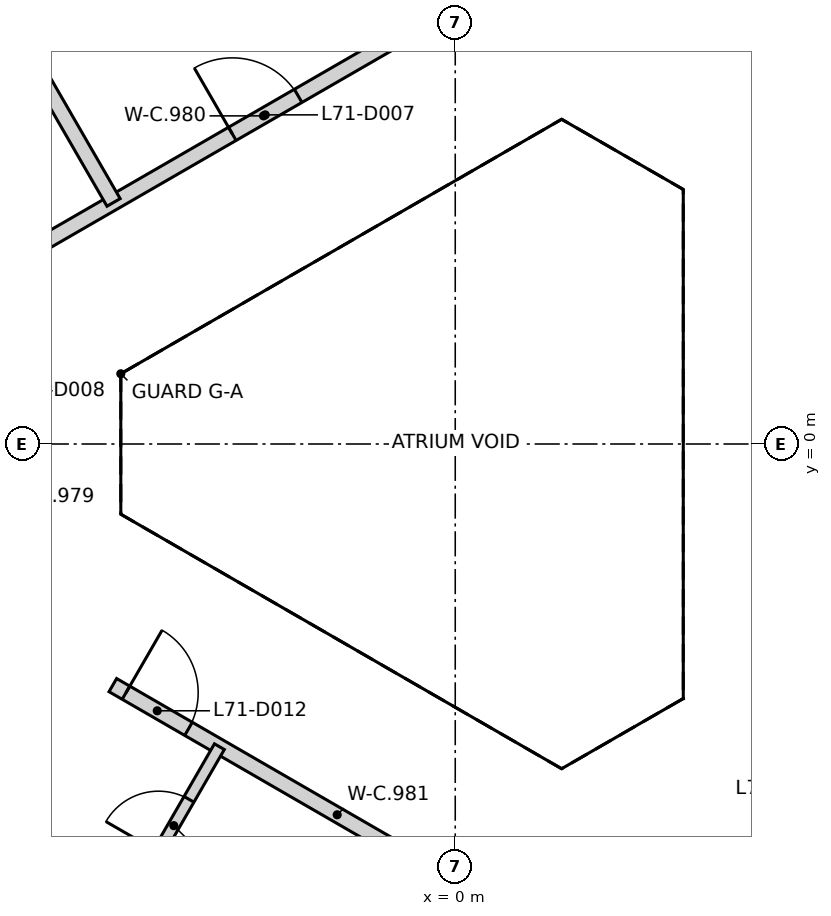
"""IFC4 building model, lengths in metres.
Left out: names, types, materials, properties, quantities, classifications, styles, units other than length and angle.
Written with IfcOpenShell. Run it as: python <this file> out.ifc"""

import sys

from ifc_helpers import new_model, si_unit, direction, frame, frame_2d, origin, place, context, subcontext, project, spatial, rectangle, extrude, element, fill, save


model = new_model("IFC4")
c1 = context("Model", 3, precision=1e-05, world=origin(), true_north=direction((0.0, 1.0)))
c2 = subcontext(c1, "Body", "Model", "MODEL_VIEW")
j1 = project(units=[si_unit("LENGTHUNIT", "METRE"), si_unit("PLANEANGLEUNIT", "RADIAN")], contexts=[c1])
p1 = place(None, origin())
s1 = spatial("IfcSite", under=j1, at=p1, CompositionType="ELEMENT")
p2 = place(p1, origin())
s2 = spatial("IfcBuilding", under=s1, at=p2, CompositionType="ELEMENT")
p3 = place(p2, frame((0.0, 0.0, 280.2)))
s3 = spatial("IfcBuildingStorey", under=s2, at=p3, CompositionType="ELEMENT", Elevation=280.2)
p4 = place(p3, frame((-6.4, 2.079, 0.0), z_axis=(0.0, 0.0, 1.0), x_axis=(0.866044821263, 0.499966366432, 0.0)))
e1 = element("IfcWall", 1, at=p4, inside=s3, PredefinedType="PARTITIONING", context=c2, shape_type="SweptSolid", body=[
    extrude(rectangle(XDim=8.953, YDim=0.2, at=frame_2d((4.477, 0.0))), origin(), (0.0, 0.0, 1.0), 3.25),
])
p5 = place(p4, frame((4.003, 0.0, 0.0)))
e2 = element("IfcOpeningElement", 2, at=p5, cuts=e1, PredefinedType="OPENING", context=c2, shape_type="SweptSolid", body=[
    extrude(rectangle(XDim=1.0, YDim=2.1, at=frame_2d((0.5, 1.05))), frame((0.0, 0.11, 0.0), z_axis=(0.0, -1.0, 0.0), x_axis=(1.0, 0.0, 0.0)), (0.0, 0.0, 1.0), 0.22),
])
p6 = place(p3, frame((-4.505, -3.172, 0.0), z_axis=(0.0, 0.0, 1.0), x_axis=(0.865815783666, -0.500362897061, 0.0)))
e3 = element("IfcWall", 3, at=p6, inside=s3, PredefinedType="PARTITIONING", context=c2, shape_type="SweptSolid", body=[
    extrude(rectangle(XDim=6.819, YDim=0.2, at=frame_2d((3.409, 0.0))), origin(), (0.0, 0.0, 1.0), 3.25),
])
p7 = place(p6, frame((0.2, 0.0, 0.0)))
e4 = element("IfcOpeningElement", 4, at=p7, cuts=e3, PredefinedType="OPENING", context=c2, shape_type="SweptSolid", body=[
    extrude(rectangle(XDim=0.95, YDim=2.1, at=frame_2d((0.475, 1.05))), frame((0.0, 0.11, 0.0), z_axis=(0.0, -1.0, 0.0), x_axis=(1.0, 0.0, 0.0)), (0.0, 0.0, 1.0), 0.22),
])
p8 = place(p3, frame((-11.035, 14.505, 0.0), z_axis=(0.0, 0.0, 1.0), x_axis=(0.499989597041, -0.866031409852, 0.0)))
e5 = element("IfcWall", 5, at=p8, inside=s3, PredefinedType="PARTITIONING", context=c2, shape_type="SweptSolid", body=[
    extrude(rectangle(XDim=13.079, YDim=0.2, at=frame_2d((6.54, 0.0))), origin(), (0.0, 0.0, 1.0), 3.25),
])
p9 = place(p3, frame((-4.303, -6.06, 0.0), z_axis=(0.0, 0.0, 1.0), x_axis=(0.500045362686, 0.865999212041, 0.0)))
e6 = element("IfcWall", 6, at=p9, inside=s3, PredefinedType="PARTITIONING", context=c2, shape_type="SweptSolid", body=[
    extrude(rectangle(XDim=2.4, YDim=0.15, at=frame_2d((1.2, 0.0))), origin(), (0.0, 0.0, 1.0), 3.25),
])
p10 = place(p9, frame((0.8, 0.0, 0.0)))
e7 = element("IfcOpeningElement", 7, at=p10, cuts=e6, PredefinedType="OPENING", context=c2, shape_type="SweptSolid", body=[
    extrude(rectangle(XDim=0.8, YDim=2.1, at=frame_2d((0.4, 1.05))), frame((0.0, 0.085, 0.0), z_axis=(0.0, -1.0, 0.0), x_axis=(1.0, 0.0, 0.0)), (0.0, 0.0, 1.0), 0.17),
])
p11 = place(p5, origin())
e8 = element("IfcDoor", 8, at=p11, inside=s3, OperationType="SINGLE_SWING_LEFT", PredefinedType="DOOR", context=c2, shape_type="SweptSolid", body=[
    extrude(rectangle(XDim=1.0, YDim=2.1, at=frame_2d((0.5, 1.05))), frame((0.0, 0.025, 0.0), z_axis=(0.0, -1.0, 0.0), x_axis=(1.0, 0.0, 0.0)), (0.0, 0.0, 1.0), 0.05),
])
fill(e2, e8)
p12 = place(p7, frame((0.95, 0.0, 0.0), z_axis=(0.0, 0.0, 1.0), x_axis=(-1.0, 0.0, 0.0)))
e9 = element("IfcDoor", 9, at=p12, inside=s3, OperationType="SINGLE_SWING_LEFT", PredefinedType="DOOR", context=c2, shape_type="SweptSolid", body=[
    extrude(rectangle(XDim=0.95, YDim=2.1, at=frame_2d((0.475, 1.05))), frame((0.0, 0.025, 0.0), z_axis=(0.0, -1.0, 0.0), x_axis=(1.0, 0.0, 0.0)), (0.0, 0.0, 1.0), 0.05),
])
fill(e4, e9)
p13 = place(p10, frame((0.8, 0.0, 0.0), z_axis=(0.0, 0.0, 1.0), x_axis=(-1.0, 0.0, 0.0)))
e10 = element("IfcDoor", 10, at=p13, inside=s3, OperationType="SINGLE_SWING_LEFT", PredefinedType="DOOR", context=c2, shape_type="SweptSolid", body=[
    extrude(rectangle(XDim=0.8, YDim=2.1, at=frame_2d((0.4, 1.05))), frame((0.0, 0.025, 0.0), z_axis=(0.0, -1.0, 0.0), x_axis=(1.0, 0.0, 0.0)), (0.0, 0.0, 1.0), 0.05),
])
fill(e7, e10)
save(model, sys.argv[1])
